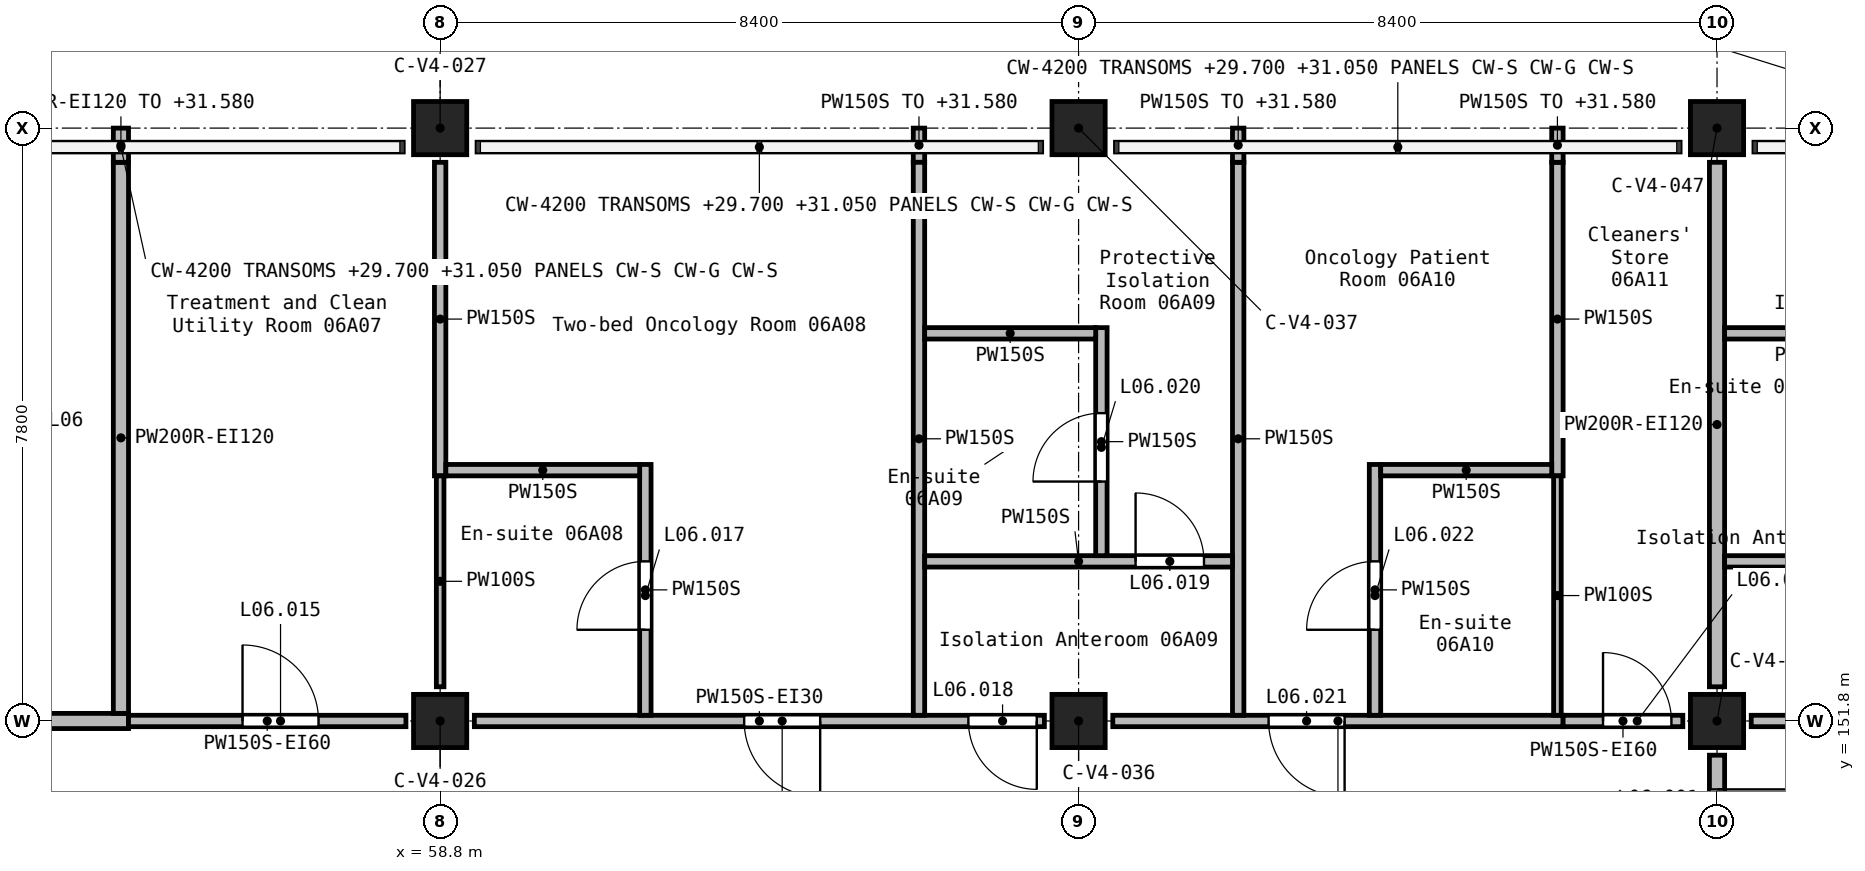
"""IFC4 building model, lengths in metres.
Left out: names, types, materials, properties, quantities, classifications, styles, units other than length and angle.
Written with IfcOpenShell. Run it as: python <this file> out.ifc"""

import sys

from ifc_helpers import new_model, si_unit, direction, frame, frame_2d, origin, origin_2d, place, context, subcontext, project, spatial, rectangle, extrude, element, fill, save


model = new_model("IFC4")
c1 = context("Model", 3, precision=1e-05, world=origin(), true_north=direction((0.0, 1.0)))
c2 = subcontext(c1, "Body", "Model", "MODEL_VIEW")
j1 = project(units=[si_unit("LENGTHUNIT", "METRE"), si_unit("PLANEANGLEUNIT", "RADIAN")], contexts=[c1])
p1 = place(None, origin())
s1 = spatial("IfcSite", under=j1, at=p1, CompositionType="ELEMENT")
p2 = place(p1, origin())
s2 = spatial("IfcBuilding", under=s1, at=p2, CompositionType="ELEMENT")
p3 = place(p2, frame((0.0, 0.0, 28.8)))
s3 = spatial("IfcBuildingStorey", under=s2, at=p3, CompositionType="ELEMENT", Elevation=28.8)
for number, where, z_axis, x_axis in (
    (1, (58.8, 151.8, 0.0), (0.0, 0.0, 1.0), (1.0, 0.0, 0.0)),
    (2, (58.8, 159.6, 0.0), (0.0, 0.0, 1.0), (1.0, 0.0, 0.0)),
    (3, (67.2, 151.8, 0.0), (0.0, 0.0, 1.0), (1.0, 0.0, 0.0)),
    (4, (67.2, 159.6, 0.0), (0.0, 0.0, 1.0), (1.0, 0.0, 0.0)),
    (5, (75.6, 151.8, 0.0), (0.0, 0.0, 1.0), (1.0, 0.0, 0.0)),
    (6, (75.6, 159.6, 0.0), (0.0, 0.0, 1.0), (1.0, 0.0, 0.0)),
):
    element("IfcColumn", number, at=place(p3, frame(where, z_axis=z_axis, x_axis=x_axis)), inside=s3, PredefinedType="COLUMN", context=c2, shape_type="SweptSolid", body=[
        extrude(rectangle(XDim=0.7, YDim=0.7, at=origin_2d()), origin(), (0.0, 0.0, 1.0), 3.9),
    ])
p4 = place(p3, frame((75.6, 159.15, 0.0), z_axis=(0.0, 0.0, 1.0), x_axis=(0.0, -1.0, 0.0)))
e7 = element("IfcWall", 7, at=p4, inside=s3, PredefinedType="SOLIDWALL", context=c2, shape_type="SweptSolid", body=[
    extrude(rectangle(XDim=6.9, YDim=0.2, at=frame_2d((3.45, 0.0))), origin(), (0.0, 0.0, 1.0), 3.6),
])
p5 = place(p3, frame((75.6, 151.35, 0.0), z_axis=(0.0, 0.0, 1.0), x_axis=(0.0, -1.0, 0.0)))
e8 = element("IfcWall", 8, at=p5, inside=s3, PredefinedType="SOLIDWALL", context=c2, shape_type="SweptSolid", body=[
    extrude(rectangle(XDim=2.7, YDim=0.2, at=frame_2d((1.35, 0.0))), origin(), (0.0, 0.0, 1.0), 3.6),
])
p6 = place(p5, frame((0.45, 0.0, 0.0)))
e9 = element("IfcOpeningElement", 9, at=p6, cuts=e8, PredefinedType="OPENING", context=c2, shape_type="SweptSolid", body=[
    extrude(rectangle(XDim=1.8, YDim=2.1, at=frame_2d((0.9, 1.05))), frame((0.0, 0.11, 0.0), z_axis=(0.0, -1.0, 0.0), x_axis=(1.0, 0.0, 0.0)), (0.0, 0.0, 1.0), 0.22),
])
p7 = place(p3, frame((50.85, 151.8, 0.0), z_axis=(0.0, 0.0, 1.0), x_axis=(1.0, 0.0, 0.0)))
e10 = element("IfcWall", 10, at=p7, inside=s3, PredefinedType="SOLIDWALL", context=c2, shape_type="SweptSolid", body=[
    extrude(rectangle(XDim=3.85, YDim=0.2, at=frame_2d((1.925, 0.0))), origin(), (0.0, 0.0, 1.0), 3.6),
])
p8 = place(p7, frame((1.15, 0.0, 0.0)))
e11 = element("IfcOpeningElement", 11, at=p8, cuts=e10, PredefinedType="OPENING", context=c2, shape_type="SweptSolid", body=[
    extrude(rectangle(XDim=1.0, YDim=2.1, at=frame_2d((0.5, 1.05))), frame((0.0, 0.11, 0.0), z_axis=(0.0, -1.0, 0.0), x_axis=(1.0, 0.0, 0.0)), (0.0, 0.0, 1.0), 0.22),
])
p9 = place(p3, frame((54.6, 151.9, 0.0), z_axis=(0.0, 0.0, 1.0), x_axis=(0.0, 1.0, 0.0)))
e12 = element("IfcWall", 12, at=p9, inside=s3, PredefinedType="SOLIDWALL", context=c2, shape_type="SweptSolid", body=[
    extrude(rectangle(XDim=7.25, YDim=0.2, at=frame_2d((3.625, 0.0))), origin(), (0.0, 0.0, 1.0), 3.6),
])
p10 = place(p3, frame((54.6, 159.15, 0.0), z_axis=(0.0, 0.0, 1.0), x_axis=(0.0, 1.0, 0.0)))
e13 = element("IfcWall", 13, at=p10, inside=s3, PredefinedType="SOLIDWALL", context=c2, shape_type="SweptSolid", body=[
    extrude(rectangle(XDim=0.45, YDim=0.2, at=frame_2d((0.225, 0.0))), origin(), (0.0, 0.0, 1.0), 2.78),
])
p11 = place(p3, frame((73.575, 151.8, 0.0), z_axis=(0.0, 0.0, 1.0), x_axis=(-1.0, 0.0, 0.0)))
e14 = element("IfcWall", 14, at=p11, inside=s3, PredefinedType="PARTITIONING", context=c2, shape_type="SweptSolid", body=[
    extrude(rectangle(XDim=5.925, YDim=0.15, at=frame_2d((2.962, 0.0))), origin(), (0.0, 0.0, 1.0), 3.6),
])
p12 = place(p11, frame((2.875, 0.0, 0.0)))
e15 = element("IfcOpeningElement", 15, at=p12, cuts=e14, PredefinedType="OPENING", context=c2, shape_type="SweptSolid", body=[
    extrude(rectangle(XDim=1.0, YDim=2.1, at=frame_2d((0.5, 1.05))), frame((0.0, 0.085, 0.0), z_axis=(0.0, -1.0, 0.0), x_axis=(1.0, 0.0, 0.0)), (0.0, 0.0, 1.0), 0.17),
])
p13 = place(p3, frame((66.75, 151.8, 0.0), z_axis=(0.0, 0.0, 1.0), x_axis=(-1.0, 0.0, 0.0)))
e16 = element("IfcWall", 16, at=p13, inside=s3, PredefinedType="PARTITIONING", context=c2, shape_type="SweptSolid", body=[
    extrude(rectangle(XDim=7.5, YDim=0.15, at=frame_2d((3.75, 0.0))), origin(), (0.0, 0.0, 1.0), 3.6),
])
p14 = place(p13, frame((2.95, 0.0, 0.0)))
e17 = element("IfcOpeningElement", 17, at=p14, cuts=e16, PredefinedType="OPENING", context=c2, shape_type="SweptSolid", body=[
    extrude(rectangle(XDim=1.0, YDim=2.1, at=frame_2d((0.5, 1.05))), frame((0.0, 0.085, 0.0), z_axis=(0.0, -1.0, 0.0), x_axis=(1.0, 0.0, 0.0)), (0.0, 0.0, 1.0), 0.17),
])
p15 = place(p13, frame((0.1, 0.0, 0.0)))
e18 = element("IfcOpeningElement", 18, at=p15, cuts=e16, PredefinedType="OPENING", context=c2, shape_type="SweptSolid", body=[
    extrude(rectangle(XDim=0.9, YDim=2.1, at=frame_2d((0.45, 1.05))), frame((0.0, 0.085, 0.0), z_axis=(0.0, -1.0, 0.0), x_axis=(1.0, 0.0, 0.0)), (0.0, 0.0, 1.0), 0.17),
])
p16 = place(p3, frame((76.05, 151.8, 0.0), z_axis=(0.0, 0.0, 1.0), x_axis=(1.0, 0.0, 0.0)))
e19 = element("IfcWall", 19, at=p16, inside=s3, PredefinedType="PARTITIONING", context=c2, shape_type="SweptSolid", body=[
    extrude(rectangle(XDim=3.825, YDim=0.15, at=frame_2d((1.913, 0.0))), origin(), (0.0, 0.0, 1.0), 3.6),
])
p17 = place(p16, frame((1.2, 0.0, 0.0)))
e20 = element("IfcOpeningElement", 20, at=p17, cuts=e19, PredefinedType="OPENING", context=c2, shape_type="SweptSolid", body=[
    extrude(rectangle(XDim=0.9, YDim=2.1, at=frame_2d((0.45, 1.05))), frame((0.0, 0.085, 0.0), z_axis=(0.0, -1.0, 0.0), x_axis=(1.0, 0.0, 0.0)), (0.0, 0.0, 1.0), 0.17),
])
p18 = place(p3, frame((54.7, 151.8, 0.0), z_axis=(0.0, 0.0, 1.0), x_axis=(1.0, 0.0, 0.0)))
e21 = element("IfcWall", 21, at=p18, inside=s3, PredefinedType="PARTITIONING", context=c2, shape_type="SweptSolid", body=[
    extrude(rectangle(XDim=3.65, YDim=0.15, at=frame_2d((1.825, 0.0))), origin(), (0.0, 0.0, 1.0), 3.6),
])
p19 = place(p18, frame((1.5, 0.0, 0.0)))
e22 = element("IfcOpeningElement", 22, at=p19, cuts=e21, PredefinedType="OPENING", context=c2, shape_type="SweptSolid", body=[
    extrude(rectangle(XDim=1.0, YDim=2.1, at=frame_2d((0.5, 1.05))), frame((0.0, 0.085, 0.0), z_axis=(0.0, -1.0, 0.0), x_axis=(1.0, 0.0, 0.0)), (0.0, 0.0, 1.0), 0.17),
])
p20 = place(p3, frame((73.575, 151.8, 0.0), z_axis=(0.0, 0.0, 1.0), x_axis=(1.0, 0.0, 0.0)))
e23 = element("IfcWall", 23, at=p20, inside=s3, PredefinedType="PARTITIONING", context=c2, shape_type="SweptSolid", body=[
    extrude(rectangle(XDim=1.575, YDim=0.15, at=frame_2d((0.788, 0.0))), origin(), (0.0, 0.0, 1.0), 3.6),
])
p21 = place(p20, frame((0.525, 0.0, 0.0)))
e24 = element("IfcOpeningElement", 24, at=p21, cuts=e23, PredefinedType="OPENING", context=c2, shape_type="SweptSolid", body=[
    extrude(rectangle(XDim=0.9, YDim=2.1, at=frame_2d((0.45, 1.05))), frame((0.0, 0.085, 0.0), z_axis=(0.0, -1.0, 0.0), x_axis=(1.0, 0.0, 0.0)), (0.0, 0.0, 1.0), 0.17),
])
p22 = place(p3, frame((65.1, 159.6, 0.0), z_axis=(0.0, 0.0, 1.0), x_axis=(0.0, -1.0, 0.0)))
e25 = element("IfcWall", 25, at=p22, inside=s3, PredefinedType="PARTITIONING", context=c2, shape_type="SweptSolid", body=[
    extrude(rectangle(XDim=0.45, YDim=0.15, at=frame_2d((0.225, 0.0))), origin(), (0.0, 0.0, 1.0), 2.78),
])
for number, where, z_axis, x_axis in (
    (26, (65.1, 159.15, 0.0), (0.0, 0.0, 1.0), (0.0, -1.0, 0.0)),
    (27, (69.3, 151.875, 0.0), (0.0, 0.0, 1.0), (0.0, 1.0, 0.0)),
):
    element("IfcWall", number, at=place(p3, frame(where, z_axis=z_axis, x_axis=x_axis)), inside=s3, PredefinedType="PARTITIONING", context=c2, shape_type="SweptSolid", body=[
        extrude(rectangle(XDim=7.275, YDim=0.15, at=frame_2d((3.637, 0.0))), origin(), (0.0, 0.0, 1.0), 3.6),
    ])
p23 = place(p3, frame((69.3, 159.15, 0.0), z_axis=(0.0, 0.0, 1.0), x_axis=(0.0, 1.0, 0.0)))
e28 = element("IfcWall", 28, at=p23, inside=s3, PredefinedType="PARTITIONING", context=c2, shape_type="SweptSolid", body=[
    extrude(rectangle(XDim=0.45, YDim=0.15, at=frame_2d((0.225, 0.0))), origin(), (0.0, 0.0, 1.0), 2.78),
])
for number, where, z_axis, x_axis in (
    (29, (58.8, 155.025, 0.0), (0.0, 0.0, 1.0), (0.0, 1.0, 0.0)),
    (30, (73.5, 155.025, 0.0), (0.0, 0.0, 1.0), (0.0, 1.0, 0.0)),
):
    element("IfcWall", number, at=place(p3, frame(where, z_axis=z_axis, x_axis=x_axis)), inside=s3, PredefinedType="PARTITIONING", context=c2, shape_type="SweptSolid", body=[
        extrude(rectangle(XDim=4.125, YDim=0.15, at=frame_2d((2.062, 0.0))), origin(), (0.0, 0.0, 1.0), 3.6),
    ])
p24 = place(p3, frame((73.5, 159.15, 0.0), z_axis=(0.0, 0.0, 1.0), x_axis=(0.0, 1.0, 0.0)))
e31 = element("IfcWall", 31, at=p24, inside=s3, PredefinedType="PARTITIONING", context=c2, shape_type="SweptSolid", body=[
    extrude(rectangle(XDim=0.45, YDim=0.15, at=frame_2d((0.225, 0.0))), origin(), (0.0, 0.0, 1.0), 2.78),
])
p25 = place(p3, frame((65.175, 153.9, 0.0), z_axis=(0.0, 0.0, 1.0), x_axis=(1.0, 0.0, 0.0)))
e32 = element("IfcWall", 32, at=p25, inside=s3, PredefinedType="PARTITIONING", context=c2, shape_type="SweptSolid", body=[
    extrude(rectangle(XDim=4.05, YDim=0.15, at=frame_2d((2.025, 0.0))), origin(), (0.0, 0.0, 1.0), 3.6),
])
p26 = place(p25, frame((2.775, 0.0, 0.0)))
e33 = element("IfcOpeningElement", 33, at=p26, cuts=e32, PredefinedType="OPENING", context=c2, shape_type="SweptSolid", body=[
    extrude(rectangle(XDim=0.9, YDim=2.1, at=frame_2d((0.45, 1.05))), frame((0.0, 0.085, 0.0), z_axis=(0.0, -1.0, 0.0), x_axis=(1.0, 0.0, 0.0)), (0.0, 0.0, 1.0), 0.17),
])
p27 = place(p3, frame((75.7, 153.9, 0.0), z_axis=(0.0, 0.0, 1.0), x_axis=(1.0, 0.0, 0.0)))
e34 = element("IfcWall", 34, at=p27, inside=s3, PredefinedType="PARTITIONING", context=c2, shape_type="SweptSolid", body=[
    extrude(rectangle(XDim=4.025, YDim=0.15, at=frame_2d((2.013, 0.0))), origin(), (0.0, 0.0, 1.0), 3.6),
])
p28 = place(p27, frame((2.75, 0.0, 0.0)))
e35 = element("IfcOpeningElement", 35, at=p28, cuts=e34, PredefinedType="OPENING", context=c2, shape_type="SweptSolid", body=[
    extrude(rectangle(XDim=0.9, YDim=2.1, at=frame_2d((0.45, 1.05))), frame((0.0, 0.085, 0.0), z_axis=(0.0, -1.0, 0.0), x_axis=(1.0, 0.0, 0.0)), (0.0, 0.0, 1.0), 0.17),
])
p29 = place(p3, frame((61.5, 151.875, 0.0), z_axis=(0.0, 0.0, 1.0), x_axis=(0.0, 1.0, 0.0)))
e36 = element("IfcWall", 36, at=p29, inside=s3, PredefinedType="PARTITIONING", context=c2, shape_type="SweptSolid", body=[
    extrude(rectangle(XDim=3.3, YDim=0.15, at=frame_2d((1.65, 0.0))), origin(), (0.0, 0.0, 1.0), 3.6),
])
p30 = place(p29, frame((1.125, 0.0, 0.0)))
e37 = element("IfcOpeningElement", 37, at=p30, cuts=e36, PredefinedType="OPENING", context=c2, shape_type="SweptSolid", body=[
    extrude(rectangle(XDim=0.9, YDim=2.1, at=frame_2d((0.45, 1.05))), frame((0.0, 0.085, 0.0), z_axis=(0.0, -1.0, 0.0), x_axis=(1.0, 0.0, 0.0)), (0.0, 0.0, 1.0), 0.17),
])
p31 = place(p3, frame((71.1, 151.875, 0.0), z_axis=(0.0, 0.0, 1.0), x_axis=(0.0, 1.0, 0.0)))
e38 = element("IfcWall", 38, at=p31, inside=s3, PredefinedType="PARTITIONING", context=c2, shape_type="SweptSolid", body=[
    extrude(rectangle(XDim=3.3, YDim=0.15, at=frame_2d((1.65, 0.0))), origin(), (0.0, 0.0, 1.0), 3.6),
])
p32 = place(p31, frame((1.125, 0.0, 0.0)))
e39 = element("IfcOpeningElement", 39, at=p32, cuts=e38, PredefinedType="OPENING", context=c2, shape_type="SweptSolid", body=[
    extrude(rectangle(XDim=0.9, YDim=2.1, at=frame_2d((0.45, 1.05))), frame((0.0, 0.085, 0.0), z_axis=(0.0, -1.0, 0.0), x_axis=(1.0, 0.0, 0.0)), (0.0, 0.0, 1.0), 0.17),
])
p33 = place(p3, frame((67.5, 153.975, 0.0), z_axis=(0.0, 0.0, 1.0), x_axis=(0.0, 1.0, 0.0)))
e40 = element("IfcWall", 40, at=p33, inside=s3, PredefinedType="PARTITIONING", context=c2, shape_type="SweptSolid", body=[
    extrude(rectangle(XDim=3.0, YDim=0.15, at=frame_2d((1.5, 0.0))), origin(), (0.0, 0.0, 1.0), 3.6),
])
p34 = place(p33, frame((0.975, 0.0, 0.0)))
e41 = element("IfcOpeningElement", 41, at=p34, cuts=e40, PredefinedType="OPENING", context=c2, shape_type="SweptSolid", body=[
    extrude(rectangle(XDim=0.9, YDim=2.1, at=frame_2d((0.45, 1.05))), frame((0.0, 0.085, 0.0), z_axis=(0.0, -1.0, 0.0), x_axis=(1.0, 0.0, 0.0)), (0.0, 0.0, 1.0), 0.17),
])
p35 = place(p3, frame((58.875, 155.1, 0.0), z_axis=(0.0, 0.0, 1.0), x_axis=(1.0, 0.0, 0.0)))
e42 = element("IfcWall", 42, at=p35, inside=s3, PredefinedType="PARTITIONING", context=c2, shape_type="SweptSolid", body=[
    extrude(rectangle(XDim=2.55, YDim=0.15, at=frame_2d((1.275, 0.0))), origin(), (0.0, 0.0, 1.0), 3.6),
])
for number, where, z_axis, x_axis in (
    (43, (65.175, 156.9, 0.0), (0.0, 0.0, 1.0), (1.0, 0.0, 0.0)),
    (44, (71.175, 155.1, 0.0), (0.0, 0.0, 1.0), (1.0, 0.0, 0.0)),
):
    element("IfcWall", number, at=place(p3, frame(where, z_axis=z_axis, x_axis=x_axis)), inside=s3, PredefinedType="PARTITIONING", context=c2, shape_type="SweptSolid", body=[
        extrude(rectangle(XDim=2.25, YDim=0.15, at=frame_2d((1.125, 0.0))), origin(), (0.0, 0.0, 1.0), 3.6),
    ])
p36 = place(p3, frame((75.7, 156.9, 0.0), z_axis=(0.0, 0.0, 1.0), x_axis=(1.0, 0.0, 0.0)))
e45 = element("IfcWall", 45, at=p36, inside=s3, PredefinedType="PARTITIONING", context=c2, shape_type="SweptSolid", body=[
    extrude(rectangle(XDim=2.225, YDim=0.15, at=frame_2d((1.113, 0.0))), origin(), (0.0, 0.0, 1.0), 3.6),
])
p37 = place(p3, frame((58.8, 152.25, 0.0), z_axis=(0.0, 0.0, 1.0), x_axis=(0.0, 1.0, 0.0)))
e46 = element("IfcWall", 46, at=p37, inside=s3, PredefinedType="PARTITIONING", context=c2, shape_type="SweptSolid", body=[
    extrude(rectangle(XDim=2.775, YDim=0.1, at=frame_2d((1.387, 0.0))), origin(), (0.0, 0.0, 1.0), 3.6),
])
p38 = place(p3, frame((73.5, 151.875, 0.0), z_axis=(0.0, 0.0, 1.0), x_axis=(0.0, 1.0, 0.0)))
e47 = element("IfcWall", 47, at=p38, inside=s3, PredefinedType="PARTITIONING", context=c2, shape_type="SweptSolid", body=[
    extrude(rectangle(XDim=3.15, YDim=0.1, at=frame_2d((1.575, 0.0))), origin(), (0.0, 0.0, 1.0), 3.6),
])
p39 = place(p6, origin())
e48 = element("IfcDoor", 48, at=p39, inside=s3, OperationType="DOUBLE_DOOR_SINGLE_SWING", PredefinedType="DOOR", context=c2, shape_type="SweptSolid", body=[
    extrude(rectangle(XDim=1.8, YDim=2.1, at=frame_2d((0.9, 1.05))), frame((0.0, 0.025, 0.0), z_axis=(0.0, -1.0, 0.0), x_axis=(1.0, 0.0, 0.0)), (0.0, 0.0, 1.0), 0.05),
])
fill(e9, e48)
p40 = place(p19, origin())
e49 = element("IfcDoor", 49, at=p40, inside=s3, OperationType="SINGLE_SWING_RIGHT", PredefinedType="DOOR", context=c2, shape_type="SweptSolid", body=[
    extrude(rectangle(XDim=1.0, YDim=2.1, at=frame_2d((0.5, 1.05))), frame((0.0, 0.025, 0.0), z_axis=(0.0, -1.0, 0.0), x_axis=(1.0, 0.0, 0.0)), (0.0, 0.0, 1.0), 0.05),
])
fill(e22, e49)
p41 = place(p14, frame((1.0, 0.0, 0.0), z_axis=(0.0, 0.0, 1.0), x_axis=(-1.0, 0.0, 0.0)))
e50 = element("IfcDoor", 50, at=p41, inside=s3, OperationType="SINGLE_SWING_RIGHT", PredefinedType="DOOR", context=c2, shape_type="SweptSolid", body=[
    extrude(rectangle(XDim=1.0, YDim=2.1, at=frame_2d((0.5, 1.05))), frame((0.0, 0.025, 0.0), z_axis=(0.0, -1.0, 0.0), x_axis=(1.0, 0.0, 0.0)), (0.0, 0.0, 1.0), 0.05),
])
fill(e17, e50)
p42 = place(p30, origin())
e51 = element("IfcDoor", 51, at=p42, inside=s3, OperationType="SINGLE_SWING_LEFT", PredefinedType="DOOR", context=c2, shape_type="SweptSolid", body=[
    extrude(rectangle(XDim=0.9, YDim=2.1, at=frame_2d((0.45, 1.05))), frame((0.0, 0.025, 0.0), z_axis=(0.0, -1.0, 0.0), x_axis=(1.0, 0.0, 0.0)), (0.0, 0.0, 1.0), 0.05),
])
fill(e37, e51)
p43 = place(p15, frame((0.9, 0.0, 0.0), z_axis=(0.0, 0.0, 1.0), x_axis=(-1.0, 0.0, 0.0)))
e52 = element("IfcDoor", 52, at=p43, inside=s3, OperationType="SINGLE_SWING_RIGHT", PredefinedType="DOOR", context=c2, shape_type="SweptSolid", body=[
    extrude(rectangle(XDim=0.9, YDim=2.1, at=frame_2d((0.45, 1.05))), frame((0.0, 0.025, 0.0), z_axis=(0.0, -1.0, 0.0), x_axis=(1.0, 0.0, 0.0)), (0.0, 0.0, 1.0), 0.05),
])
fill(e18, e52)
p44 = place(p26, origin())
e53 = element("IfcDoor", 53, at=p44, inside=s3, OperationType="SINGLE_SWING_RIGHT", PredefinedType="DOOR", context=c2, shape_type="SweptSolid", body=[
    extrude(rectangle(XDim=0.9, YDim=2.1, at=frame_2d((0.45, 1.05))), frame((0.0, 0.025, 0.0), z_axis=(0.0, -1.0, 0.0), x_axis=(1.0, 0.0, 0.0)), (0.0, 0.0, 1.0), 0.05),
])
fill(e33, e53)
p45 = place(p34, origin())
e54 = element("IfcDoor", 54, at=p45, inside=s3, OperationType="SINGLE_SWING_LEFT", PredefinedType="DOOR", context=c2, shape_type="SweptSolid", body=[
    extrude(rectangle(XDim=0.9, YDim=2.1, at=frame_2d((0.45, 1.05))), frame((0.0, 0.025, 0.0), z_axis=(0.0, -1.0, 0.0), x_axis=(1.0, 0.0, 0.0)), (0.0, 0.0, 1.0), 0.05),
])
fill(e41, e54)
p46 = place(p12, frame((1.0, 0.0, 0.0), z_axis=(0.0, 0.0, 1.0), x_axis=(-1.0, 0.0, 0.0)))
e55 = element("IfcDoor", 55, at=p46, inside=s3, OperationType="SINGLE_SWING_LEFT", PredefinedType="DOOR", context=c2, shape_type="SweptSolid", body=[
    extrude(rectangle(XDim=1.0, YDim=2.1, at=frame_2d((0.5, 1.05))), frame((0.0, 0.025, 0.0), z_axis=(0.0, -1.0, 0.0), x_axis=(1.0, 0.0, 0.0)), (0.0, 0.0, 1.0), 0.05),
])
fill(e15, e55)
p47 = place(p32, frame((0.9, 0.0, 0.0), z_axis=(0.0, 0.0, 1.0), x_axis=(-1.0, 0.0, 0.0)))
e56 = element("IfcDoor", 56, at=p47, inside=s3, OperationType="SINGLE_SWING_RIGHT", PredefinedType="DOOR", context=c2, shape_type="SweptSolid", body=[
    extrude(rectangle(XDim=0.9, YDim=2.1, at=frame_2d((0.45, 1.05))), frame((0.0, 0.025, 0.0), z_axis=(0.0, -1.0, 0.0), x_axis=(1.0, 0.0, 0.0)), (0.0, 0.0, 1.0), 0.05),
])
fill(e39, e56)
p48 = place(p21, origin())
e57 = element("IfcDoor", 57, at=p48, inside=s3, OperationType="SINGLE_SWING_RIGHT", PredefinedType="DOOR", context=c2, shape_type="SweptSolid", body=[
    extrude(rectangle(XDim=0.9, YDim=2.1, at=frame_2d((0.45, 1.05))), frame((0.0, 0.025, 0.0), z_axis=(0.0, -1.0, 0.0), x_axis=(1.0, 0.0, 0.0)), (0.0, 0.0, 1.0), 0.05),
])
fill(e24, e57)
save(model, sys.argv[1])
